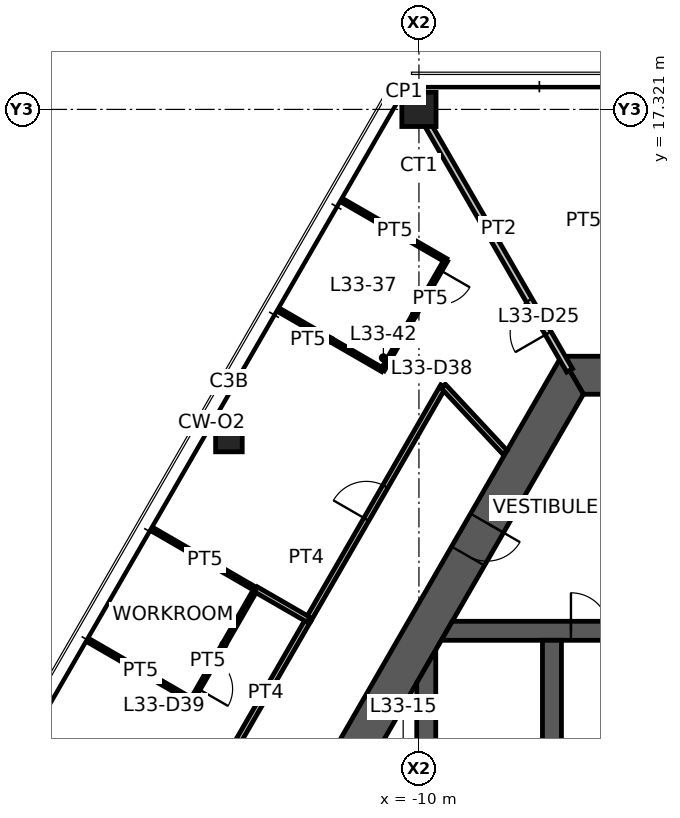
"""IFC4 building model, lengths in metres.
Left out: names, types, materials, properties, quantities, classifications, styles, units other than length and angle.
Written with IfcOpenShell. Run it as: python <this file> out.ifc"""

import sys

from ifc_helpers import new_model, si_unit, direction, frame, frame_2d, origin, origin_2d, place, context, subcontext, project, spatial, polyline, rectangle, hollow_rectangle, outline, extrude, element, fill, save


model = new_model("IFC4")
c1 = context("Model", 3, precision=1e-05, world=origin(), true_north=direction((0.0, 1.0)))
c2 = subcontext(c1, "Body", "Model", "MODEL_VIEW")
j1 = project(units=[si_unit("LENGTHUNIT", "METRE"), si_unit("PLANEANGLEUNIT", "RADIAN")], contexts=[c1])
p1 = place(None, origin())
s1 = spatial("IfcSite", under=j1, at=p1, CompositionType="ELEMENT")
p2 = place(p1, origin())
s2 = spatial("IfcBuilding", under=s1, at=p2, CompositionType="ELEMENT")
p3 = place(p2, frame((0.0, 0.0, 133.1)))
s3 = spatial("IfcBuildingStorey", under=s2, at=p3, CompositionType="ELEMENT", Elevation=133.1)
p4 = place(p3, frame((-10.0, 17.321, 0.0), z_axis=(0.0, 0.0, 1.0), x_axis=(1.0, 0.0, 0.0)))
e1 = element("IfcColumn", 1, at=p4, inside=s3, PredefinedType="COLUMN", context=c2, shape_type="SweptSolid", body=[
    extrude(hollow_rectangle(XDim=0.9, YDim=0.9, WallThickness=0.07, at=origin_2d()), origin(), (0.0, 0.0, 1.0), 3.9),
])
p5 = place(p3, frame((-15.0, 8.66, 0.0), z_axis=(0.0, 0.0, 1.0), x_axis=(1.0, 0.0, 0.0)))
e2 = element("IfcColumn", 2, at=p5, inside=s3, PredefinedType="COLUMN", context=c2, shape_type="SweptSolid", body=[
    extrude(hollow_rectangle(XDim=0.7, YDim=0.7, WallThickness=0.036, at=origin_2d()), origin(), (0.0, 0.0, 1.0), 3.9),
])
p6 = place(p3, frame((5.961, 10.325, 0.0), z_axis=(0.0, 0.0, 1.0), x_axis=(-1.0, 0.0, 0.0)))
e3 = element("IfcWall", 3, at=p6, inside=s3, PredefinedType="SHEAR", context=c2, shape_type="SweptSolid", body=[
    extrude(outline(polyline([(-0.289, -0.5), (4.661, -0.5), (5.561, -0.5), (6.361, -0.5), (7.261, -0.5), (12.211, -0.5), (11.634, 0.5), (7.261, 0.5), (6.361, 0.5), (5.561, 0.5), (4.661, 0.5), (0.289, 0.5), (-0.289, -0.5)])), origin(), (0.0, 0.0, 1.0), 3.9),
])
p7 = place(p6, frame((6.361, 0.0, 0.0)))
e4 = element("IfcOpeningElement", 4, at=p7, cuts=e3, PredefinedType="OPENING", context=c2, shape_type="SweptSolid", body=[
    extrude(rectangle(XDim=0.9, YDim=2.1, at=frame_2d((0.45, 1.05))), frame((0.0, 0.51, 0.0), z_axis=(0.0, -1.0, 0.0), x_axis=(1.0, 0.0, 0.0)), (0.0, 0.0, 1.0), 1.02),
])
p8 = place(p6, frame((4.661, 0.0, 0.0)))
e5 = element("IfcOpeningElement", 5, at=p8, cuts=e3, PredefinedType="OPENING", context=c2, shape_type="SweptSolid", body=[
    extrude(rectangle(XDim=0.9, YDim=2.1, at=frame_2d((0.45, 1.05))), frame((0.0, 0.51, 0.0), z_axis=(0.0, -1.0, 0.0), x_axis=(1.0, 0.0, 0.0)), (0.0, 0.0, 1.0), 1.02),
])
p9 = place(p3, frame((-5.961, 10.325, 0.0), z_axis=(0.0, 0.0, 1.0), x_axis=(-0.500004296715, -0.866022923061, 0.0)))
e6 = element("IfcWall", 6, at=p9, inside=s3, PredefinedType="SHEAR", context=c2, shape_type="SweptSolid", body=[
    extrude(outline(polyline([(-0.289, -0.5), (4.494, -0.5), (5.494, -0.5), (12.211, -0.5), (11.634, 0.5), (5.494, 0.5), (4.494, 0.5), (0.289, 0.5), (-0.289, -0.5)])), origin(), (0.0, 0.0, 1.0), 3.9),
])
p10 = place(p9, frame((4.494, 0.0, 0.0)))
e7 = element("IfcOpeningElement", 7, at=p10, cuts=e6, PredefinedType="OPENING", context=c2, shape_type="SweptSolid", body=[
    extrude(rectangle(XDim=1.0, YDim=2.1, at=frame_2d((0.5, 1.05))), frame((0.0, 0.51, 0.0), z_axis=(0.0, -1.0, 0.0), x_axis=(1.0, 0.0, 0.0)), (0.0, 0.0, 1.0), 1.02),
])
p11 = place(p3, frame((-9.266, 3.6, 0.0), z_axis=(0.0, 0.0, 1.0), x_axis=(1.0, 0.0, 0.0)))
e8 = element("IfcWall", 8, at=p11, inside=s3, PredefinedType="SHEAR", context=c2, shape_type="SweptSolid", body=[
    extrude(outline(polyline([(-0.144, -0.25), (3.266, -0.25), (4.266, -0.25), (5.667, -0.25), (6.767, -0.25), (7.916, -0.25), (7.916, 0.25), (6.767, 0.25), (5.667, 0.25), (4.266, 0.25), (3.266, 0.25), (0.144, 0.25), (-0.144, -0.25)])), origin(), (0.0, 0.0, 1.0), 3.9),
])
p12 = place(p11, frame((3.266, 0.0, 0.0)))
e9 = element("IfcOpeningElement", 9, at=p12, cuts=e8, PredefinedType="OPENING", context=c2, shape_type="SweptSolid", body=[
    extrude(rectangle(XDim=1.0, YDim=2.1, at=frame_2d((0.5, 1.05))), frame((0.0, 0.26, 0.0), z_axis=(0.0, -1.0, 0.0), x_axis=(1.0, 0.0, 0.0)), (0.0, 0.0, 1.0), 0.52),
])
p13 = place(p11, frame((5.667, 0.0, 0.0)))
e10 = element("IfcOpeningElement", 10, at=p13, cuts=e8, PredefinedType="OPENING", context=c2, shape_type="SweptSolid", body=[
    extrude(rectangle(XDim=1.1, YDim=2.1, at=frame_2d((0.55, 1.05))), frame((0.0, 0.26, 0.0), z_axis=(0.0, -1.0, 0.0), x_axis=(1.0, 0.0, 0.0)), (0.0, 0.0, 1.0), 0.52),
])
p14 = place(p3, frame((-6.5, -3.35, 0.0), z_axis=(0.0, 0.0, 1.0), x_axis=(0.0, 1.0, 0.0)))
e11 = element("IfcWall", 11, at=p14, inside=s3, PredefinedType="SHEAR", context=c2, shape_type="SweptSolid", body=[
    extrude(rectangle(XDim=6.7, YDim=0.5, at=frame_2d((3.35, 0.0))), origin(), (0.0, 0.0, 1.0), 3.9),
])
p15 = place(p14, frame((0.1, 0.0, 0.0)))
e12 = element("IfcOpeningElement", 12, at=p15, cuts=e11, PredefinedType="OPENING", context=c2, shape_type="SweptSolid", body=[
    extrude(rectangle(XDim=1.0, YDim=2.1, at=frame_2d((0.5, 1.05))), frame((0.0, 0.26, 0.0), z_axis=(0.0, -1.0, 0.0), x_axis=(1.0, 0.0, 0.0)), (0.0, 0.0, 1.0), 0.52),
])
p16 = place(p3, frame((-9.808, -2.662, 0.0), z_axis=(0.0, 0.0, 1.0), x_axis=(0.0, 1.0, 0.0)))
e13 = element("IfcWall", 13, at=p16, inside=s3, PredefinedType="SHEAR", context=c2, shape_type="SweptSolid", body=[
    extrude(outline(polyline([(-0.433, -0.25), (5.758, -0.25), (4.892, 0.25), (0.433, 0.25), (-0.433, -0.25)])), origin(), (0.0, 0.0, 1.0), 3.9),
])
p17 = place(p3, frame((-6.035, 10.453, 0.0), z_axis=(0.0, 0.0, 1.0), x_axis=(-0.499989830942, 0.866031274813, 0.0)))
e14 = element("IfcWall", 14, at=p17, inside=s3, PredefinedType="PARTITIONING", context=c2, shape_type="SweptSolid", body=[
    extrude(rectangle(XDim=7.93, YDim=0.175, at=frame_2d((3.965, 0.0))), origin(), (0.0, 0.0, 1.0), 3.05),
])
p18 = place(p17, frame((1.13, 0.0, 0.0)))
e15 = element("IfcOpeningElement", 15, at=p18, cuts=e14, PredefinedType="OPENING", context=c2, shape_type="SweptSolid", body=[
    extrude(rectangle(XDim=1.0, YDim=2.1, at=frame_2d((0.5, 1.05))), frame((0.0, 0.098, 0.0), z_axis=(0.0, -1.0, 0.0), x_axis=(1.0, 0.0, 0.0)), (0.0, 0.0, 1.0), 0.195),
])
p19 = place(p3, frame((-15.156, 0.0, 0.0), z_axis=(0.0, 0.0, 1.0), x_axis=(0.500014848696, 0.866016830716, 0.0)))
e16 = element("IfcWall", 16, at=p19, inside=s3, PredefinedType="PARTITIONING", context=c2, shape_type="SweptSolid", body=[
    extrude(rectangle(XDim=4.505, YDim=0.15, at=frame_2d((2.252, 0.0))), origin(), (0.0, 0.0, 1.0), 2.95),
])
p20 = place(p3, frame((-12.908, 3.893, 0.0), z_axis=(0.0, 0.0, 1.0), x_axis=(0.500006411147, 0.866021702275, 0.0)))
e17 = element("IfcWall", 17, at=p20, inside=s3, PredefinedType="PARTITIONING", context=c2, shape_type="SweptSolid", body=[
    extrude(rectangle(XDim=7.095, YDim=0.15, at=frame_2d((3.548, 0.0))), origin(), (0.0, 0.0, 1.0), 2.95),
])
p21 = place(p20, frame((3.047, 0.0, 0.0)))
e18 = element("IfcOpeningElement", 18, at=p21, cuts=e17, PredefinedType="OPENING", context=c2, shape_type="SweptSolid", body=[
    extrude(rectangle(XDim=1.0, YDim=2.1, at=frame_2d((0.5, 1.05))), frame((0.0, 0.085, 0.0), z_axis=(0.0, -1.0, 0.0), x_axis=(1.0, 0.0, 0.0)), (0.0, 0.0, 1.0), 0.17),
])
p22 = place(p3, frame((-9.36, 10.038, 0.0), z_axis=(0.0, 0.0, 1.0), x_axis=(0.681997114248, -0.731354863358, 0.0)))
e19 = element("IfcWall", 19, at=p22, inside=s3, PredefinedType="PARTITIONING", context=c2, shape_type="SweptSolid", body=[
    extrude(outline(polyline([(0.0, -0.075), (2.384, -0.075), (2.384, 0.0), (2.382, 0.075), (0.0, 0.075), (0.0, -0.075)])), origin(), (0.0, 0.0, 1.0), 2.95),
])
p23 = place(p3, frame((-11.98, 14.902, 0.0), z_axis=(0.0, 0.0, 1.0), x_axis=(0.866042875753, -0.499969736442, 0.0)))
e20 = element("IfcWall", 20, at=p23, inside=s3, PredefinedType="PARTITIONING", context=c2, shape_type="SweptSolid", body=[
    extrude(rectangle(XDim=3.105, YDim=0.1, at=frame_2d((1.553, 0.0))), origin(), (0.0, 0.0, 1.0), 2.95),
])
p24 = place(p3, frame((-10.956, 10.465, 0.0), z_axis=(0.0, 0.0, 1.0), x_axis=(-0.866012296238, 0.500022702249, 0.0)))
e21 = element("IfcWall", 21, at=p24, inside=s3, PredefinedType="PARTITIONING", context=c2, shape_type="SweptSolid", body=[
    extrude(rectangle(XDim=3.144, YDim=0.1, at=frame_2d((1.572, 0.0))), origin(), (0.0, 0.0, 1.0), 2.95),
])
p25 = place(p3, frame((-9.291, 13.349, 0.0), z_axis=(0.0, 0.0, 1.0), x_axis=(-0.500033344505, -0.86600615147, 0.0)))
e22 = element("IfcWall", 22, at=p25, inside=s3, PredefinedType="PARTITIONING", context=c2, shape_type="SweptSolid", body=[
    extrude(rectangle(XDim=3.331, YDim=0.1, at=frame_2d((1.666, 0.0))), origin(), (0.0, 0.0, 1.0), 2.95),
])
p26 = place(p25, frame((0.3, 0.0, 0.0)))
e23 = element("IfcOpeningElement", 23, at=p26, cuts=e22, PredefinedType="OPENING", context=c2, shape_type="SweptSolid", body=[
    extrude(rectangle(XDim=0.9, YDim=2.1, at=frame_2d((0.45, 1.05))), frame((0.0, 0.06, 0.0), z_axis=(0.0, -1.0, 0.0), x_axis=(1.0, 0.0, 0.0)), (0.0, 0.0, 1.0), 0.12),
])
p27 = place(p3, frame((-15.974, 1.773, 0.0), z_axis=(0.0, 0.0, 1.0), x_axis=(-0.866032025414, 0.499988530825, 0.0)))
e24 = element("IfcWall", 24, at=p27, inside=s3, PredefinedType="PARTITIONING", context=c2, shape_type="SweptSolid", body=[
    extrude(rectangle(XDim=3.124, YDim=0.1, at=frame_2d((1.562, 0.0))), origin(), (0.0, 0.0, 1.0), 2.95),
])
p28 = place(p3, frame((-14.291, 4.698, 0.0), z_axis=(0.0, 0.0, 1.0), x_axis=(-0.498809626432, -0.86671157635, 0.0)))
e25 = element("IfcWall", 25, at=p28, inside=s3, PredefinedType="PARTITIONING", context=c2, shape_type="SweptSolid", body=[
    extrude(rectangle(XDim=3.374, YDim=0.1, at=frame_2d((1.687, 0.0))), origin(), (0.0, 0.0, 1.0), 2.95),
])
p29 = place(p28, frame((2.131, 0.0, 0.0)))
e26 = element("IfcOpeningElement", 26, at=p29, cuts=e25, PredefinedType="OPENING", context=c2, shape_type="SweptSolid", body=[
    extrude(rectangle(XDim=0.9, YDim=2.1, at=frame_2d((0.45, 1.05))), frame((0.0, 0.06, 0.0), z_axis=(0.0, -1.0, 0.0), x_axis=(1.0, 0.0, 0.0)), (0.0, 0.0, 1.0), 0.12),
])
p30 = place(p3, frame((-16.976, 6.248, 0.0), z_axis=(0.0, 0.0, 1.0), x_axis=(0.865232439327, -0.501370946442, 0.0)))
e27 = element("IfcWall", 27, at=p30, inside=s3, PredefinedType="PARTITIONING", context=c2, shape_type="SweptSolid", body=[
    extrude(rectangle(XDim=3.105, YDim=0.1, at=frame_2d((1.553, 0.0))), origin(), (0.0, 0.0, 1.0), 2.95),
])
p31 = place(p3, frame((-14.289, 4.691, 0.0), z_axis=(0.0, 0.0, 1.0), x_axis=(0.865925490132, -0.500173015605, 0.0)))
e28 = element("IfcWall", 28, at=p31, inside=s3, PredefinedType="PARTITIONING", context=c2, shape_type="SweptSolid", body=[
    extrude(rectangle(XDim=1.595, YDim=0.15, at=frame_2d((0.797, 0.0))), origin(), (0.0, 0.0, 1.0), 2.95),
])
p32 = place(p10, origin())
e29 = element("IfcDoor", 29, at=p32, inside=s3, OperationType="SINGLE_SWING_LEFT", PredefinedType="DOOR", context=c2, shape_type="SweptSolid", body=[
    extrude(rectangle(XDim=1.0, YDim=2.1, at=frame_2d((0.5, 1.05))), frame((0.0, 0.025, 0.0), z_axis=(0.0, -1.0, 0.0), x_axis=(1.0, 0.0, 0.0)), (0.0, 0.0, 1.0), 0.05),
])
fill(e7, e29)
p33 = place(p12, origin())
e30 = element("IfcDoor", 30, at=p33, inside=s3, OperationType="SINGLE_SWING_LEFT", PredefinedType="DOOR", context=c2, shape_type="SweptSolid", body=[
    extrude(rectangle(XDim=1.0, YDim=2.1, at=frame_2d((0.5, 1.05))), frame((0.0, 0.025, 0.0), z_axis=(0.0, -1.0, 0.0), x_axis=(1.0, 0.0, 0.0)), (0.0, 0.0, 1.0), 0.05),
])
fill(e9, e30)
p34 = place(p18, origin())
e31 = element("IfcDoor", 31, at=p34, inside=s3, OperationType="SINGLE_SWING_LEFT", PredefinedType="DOOR", context=c2, shape_type="SweptSolid", body=[
    extrude(rectangle(XDim=1.0, YDim=2.1, at=frame_2d((0.5, 1.05))), frame((0.0, 0.025, 0.0), z_axis=(0.0, -1.0, 0.0), x_axis=(1.0, 0.0, 0.0)), (0.0, 0.0, 1.0), 0.05),
])
fill(e15, e31)
p35 = place(p21, origin())
e32 = element("IfcDoor", 32, at=p35, inside=s3, OperationType="SINGLE_SWING_LEFT", PredefinedType="DOOR", context=c2, shape_type="SweptSolid", body=[
    extrude(rectangle(XDim=1.0, YDim=2.1, at=frame_2d((0.5, 1.05))), frame((0.0, 0.025, 0.0), z_axis=(0.0, -1.0, 0.0), x_axis=(1.0, 0.0, 0.0)), (0.0, 0.0, 1.0), 0.05),
])
fill(e18, e32)
p36 = place(p26, origin())
e33 = element("IfcDoor", 33, at=p36, inside=s3, OperationType="SINGLE_SWING_LEFT", PredefinedType="DOOR", context=c2, shape_type="SweptSolid", body=[
    extrude(rectangle(XDim=0.9, YDim=2.1, at=frame_2d((0.45, 1.05))), frame((0.0, 0.025, 0.0), z_axis=(0.0, -1.0, 0.0), x_axis=(1.0, 0.0, 0.0)), (0.0, 0.0, 1.0), 0.05),
])
fill(e23, e33)
p37 = place(p29, origin())
e34 = element("IfcDoor", 34, at=p37, inside=s3, OperationType="SINGLE_SWING_RIGHT", PredefinedType="DOOR", context=c2, shape_type="SweptSolid", body=[
    extrude(rectangle(XDim=0.9, YDim=2.1, at=frame_2d((0.45, 1.05))), frame((0.0, 0.025, 0.0), z_axis=(0.0, -1.0, 0.0), x_axis=(1.0, 0.0, 0.0)), (0.0, 0.0, 1.0), 0.05),
])
fill(e26, e34)
save(model, sys.argv[1])
